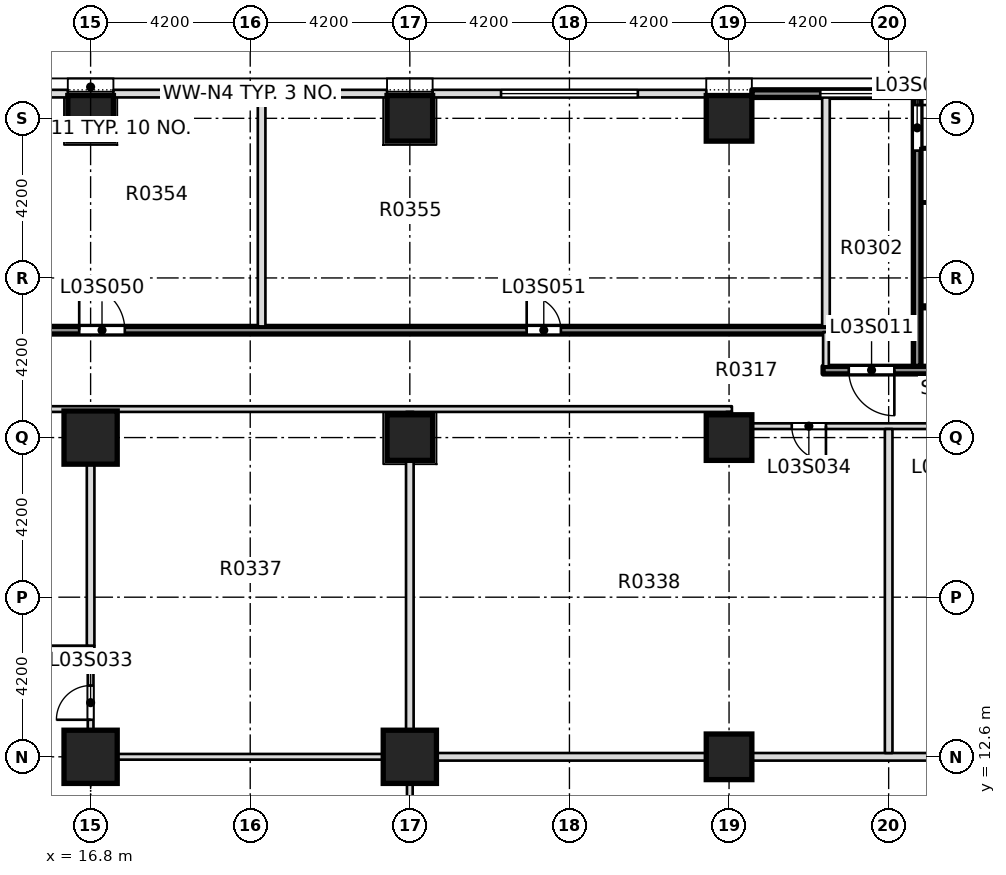
"""IFC4 building model, lengths in metres.
Left out: names, types, materials, properties, quantities, classifications, styles, units other than length and angle.
Written with IfcOpenShell. Run it as: python <this file> out.ifc"""

import sys

from ifc_helpers import new_model, si_unit, direction, frame, frame_2d, origin, origin_2d, place, context, subcontext, project, spatial, rectangle, extrude, element, fill, save


model = new_model("IFC4")
c1 = context("Model", 3, precision=1e-05, world=origin(), true_north=direction((0.0, 1.0)))
c2 = subcontext(c1, "Body", "Model", "MODEL_VIEW")
j1 = project(units=[si_unit("LENGTHUNIT", "METRE"), si_unit("PLANEANGLEUNIT", "RADIAN")], contexts=[c1])
p1 = place(None, origin())
s1 = spatial("IfcSite", under=j1, at=p1, CompositionType="ELEMENT")
p2 = place(p1, origin())
s2 = spatial("IfcBuilding", under=s1, at=p2, CompositionType="ELEMENT")
p3 = place(p2, frame((0.0, 0.0, 20.0)))
s3 = spatial("IfcBuildingStorey", under=s2, at=p3, CompositionType="ELEMENT", Elevation=20.0)
for number, where, z_axis, x_axis in (
    (1, (16.8, 12.6, -0.4), (0.0, 0.0, 1.0), (1.0, 0.0, 0.0)),
    (2, (25.2, 12.6, -0.4), (0.0, 0.0, 1.0), (1.0, 0.0, 0.0)),
    (3, (16.8, 21.0, -0.4), (0.0, 0.0, 1.0), (1.0, 0.0, 0.0)),
):
    element("IfcColumn", number, at=place(p3, frame(where, z_axis=z_axis, x_axis=x_axis)), inside=s3, PredefinedType="COLUMN", context=c2, shape_type="SweptSolid", body=[
        extrude(rectangle(XDim=1.4, YDim=1.4, at=origin_2d()), origin(), (0.0, 0.0, 1.0), 5.0),
    ])
p4 = place(p3, frame((33.6, 12.6, -0.4), z_axis=(0.0, 0.0, 1.0), x_axis=(1.0, 0.0, 0.0)))
e4 = element("IfcColumn", 4, at=p4, inside=s3, PredefinedType="COLUMN", context=c2, shape_type="SweptSolid", body=[
    extrude(rectangle(XDim=1.2, YDim=1.2, at=origin_2d()), origin(), (0.0, 0.0, 1.0), 5.4),
])
p5 = place(p3, frame((25.2, 21.0, 0.0), z_axis=(0.0, 0.0, 1.0), x_axis=(1.0, 0.0, 0.0)))
e5 = element("IfcColumn", 5, at=p5, inside=s3, PredefinedType="COLUMN", context=c2, shape_type="SweptSolid", body=[
    extrude(rectangle(XDim=1.2, YDim=1.2, at=origin_2d()), origin(), (0.0, 0.0, 1.0), 5.0),
])
p6 = place(p3, frame((33.6, 21.0, -0.4), z_axis=(0.0, 0.0, 1.0), x_axis=(1.0, 0.0, 0.0)))
e6 = element("IfcColumn", 6, at=p6, inside=s3, PredefinedType="COLUMN", context=c2, shape_type="SweptSolid", body=[
    extrude(rectangle(XDim=1.2, YDim=1.2, at=origin_2d()), origin(), (0.0, 0.0, 1.0), 5.4),
])
for number, where, z_axis, x_axis in (
    (7, (16.8, 29.4, 0.0), (0.0, 0.0, 1.0), (1.0, 0.0, 0.0)),
    (8, (25.2, 29.4, 0.0), (0.0, 0.0, 1.0), (1.0, 0.0, 0.0)),
):
    element("IfcColumn", number, at=place(p3, frame(where, z_axis=z_axis, x_axis=x_axis)), inside=s3, PredefinedType="COLUMN", context=c2, shape_type="SweptSolid", body=[
        extrude(rectangle(XDim=1.2, YDim=1.2, at=origin_2d()), origin(), (0.0, 0.0, 1.0), 5.0),
    ])
p7 = place(p3, frame((33.6, 29.4, -0.4), z_axis=(0.0, 0.0, 1.0), x_axis=(1.0, 0.0, 0.0)))
e9 = element("IfcColumn", 9, at=p7, inside=s3, PredefinedType="COLUMN", context=c2, shape_type="SweptSolid", body=[
    extrude(rectangle(XDim=1.2, YDim=1.2, at=origin_2d()), origin(), (0.0, 0.0, 1.0), 5.4),
])
p8 = place(p3, frame((16.725, 12.6, 0.0), z_axis=(0.0, 0.0, 1.0), x_axis=(1.0, 0.0, 0.0)))
e10 = element("IfcWall", 10, at=p8, inside=s3, PredefinedType="PARTITIONING", context=c2, shape_type="SweptSolid", body=[
    extrude(rectangle(XDim=8.575, YDim=0.15, at=frame_2d((4.288, 0.0))), origin(), (0.0, 0.0, 1.0), 4.6),
])
p9 = place(p3, frame((25.1, 12.6, 0.0), z_axis=(0.0, 0.0, 1.0), x_axis=(1.0, 0.0, 0.0)))
e11 = element("IfcWall", 11, at=p9, inside=s3, PredefinedType="PARTITIONING", context=c2, shape_type="SweptSolid", body=[
    extrude(rectangle(XDim=25.85, YDim=0.2, at=frame_2d((12.925, 0.0))), origin(), (0.0, 0.0, 1.0), 4.6),
])
p10 = place(p3, frame((12.601, 15.45, 0.0), z_axis=(0.0, 0.0, 1.0), x_axis=(1.0, 0.0, 0.0)))
e12 = element("IfcWall", 12, at=p10, inside=s3, PredefinedType="PARTITIONING", context=c2, shape_type="SweptSolid", body=[
    extrude(rectangle(XDim=4.299, YDim=0.15, at=frame_2d((2.149, 0.0))), origin(), (0.0, 0.0, 1.0), 4.6),
])
p11 = place(p10, frame((1.549, 0.0, 0.0)))
e13 = element("IfcOpeningElement", 13, at=p11, cuts=e12, PredefinedType="OPENING", context=c2, shape_type="SweptSolid", body=[
    extrude(rectangle(XDim=1.1, YDim=2.1, at=frame_2d((0.55, 1.05))), frame((0.0, 0.085, 0.0), z_axis=(0.0, -1.0, 0.0), x_axis=(1.0, 0.0, 0.0)), (0.0, 0.0, 1.0), 0.17),
])
p12 = place(p3, frame((33.525, 21.3, 0.0), z_axis=(0.0, 0.0, 1.0), x_axis=(1.0, 0.0, 0.0)))
e14 = element("IfcWall", 14, at=p12, inside=s3, PredefinedType="PARTITIONING", context=c2, shape_type="SweptSolid", body=[
    extrude(rectangle(XDim=8.85, YDim=0.15, at=frame_2d((4.425, 0.0))), origin(), (0.0, 0.0, 1.0), 4.6),
])
p13 = place(p12, frame((1.725, 0.0, 0.0)))
e15 = element("IfcOpeningElement", 15, at=p13, cuts=e14, PredefinedType="OPENING", context=c2, shape_type="SweptSolid", body=[
    extrude(rectangle(XDim=0.9, YDim=2.1, at=frame_2d((0.45, 1.05))), frame((0.0, 0.085, 0.0), z_axis=(0.0, -1.0, 0.0), x_axis=(1.0, 0.0, 0.0)), (0.0, 0.0, 1.0), 0.17),
])
p14 = place(p12, frame((5.525, 0.0, 0.0)))
e16 = element("IfcOpeningElement", 16, at=p14, cuts=e14, PredefinedType="OPENING", context=c2, shape_type="SweptSolid", body=[
    extrude(rectangle(XDim=0.9, YDim=2.1, at=frame_2d((0.45, 1.05))), frame((0.0, 0.085, 0.0), z_axis=(0.0, -1.0, 0.0), x_axis=(1.0, 0.0, 0.0)), (0.0, 0.0, 1.0), 0.17),
])
p15 = place(p3, frame((12.601, 21.75, 0.0), z_axis=(0.0, 0.0, 1.0), x_axis=(1.0, 0.0, 0.0)))
e17 = element("IfcWall", 17, at=p15, inside=s3, PredefinedType="PARTITIONING", context=c2, shape_type="SweptSolid", body=[
    extrude(rectangle(XDim=21.074, YDim=0.15, at=frame_2d((10.537, 0.0))), origin(), (0.0, 0.0, 1.0), 4.6),
])
p16 = place(p3, frame((36.075, 22.775, 0.0), z_axis=(0.0, 0.0, 1.0), x_axis=(1.0, 0.0, 0.0)))
e18 = element("IfcWall", 18, at=p16, inside=s3, PredefinedType="SOLIDWALL", context=c2, shape_type="SweptSolid", body=[
    extrude(rectangle(XDim=6.3, YDim=0.2, at=frame_2d((3.15, 0.0))), origin(), (0.0, 0.0, 1.0), 4.6),
])
p17 = place(p16, frame((0.675, 0.0, 0.0)))
e19 = element("IfcOpeningElement", 19, at=p17, cuts=e18, PredefinedType="OPENING", context=c2, shape_type="SweptSolid", body=[
    extrude(rectangle(XDim=1.2, YDim=2.1, at=frame_2d((0.6, 1.05))), frame((0.0, 0.11, 0.0), z_axis=(0.0, -1.0, 0.0), x_axis=(1.0, 0.0, 0.0)), (0.0, 0.0, 1.0), 0.22),
])
p18 = place(p3, frame((16.8, 12.675, 0.0), z_axis=(0.0, 0.0, 1.0), x_axis=(0.0, 1.0, 0.0)))
e20 = element("IfcWall", 20, at=p18, inside=s3, PredefinedType="PARTITIONING", context=c2, shape_type="SweptSolid", body=[
    extrude(rectangle(XDim=2.7, YDim=0.15, at=frame_2d((1.35, 0.0))), origin(), (0.0, 0.0, 1.0), 4.6),
])
p19 = place(p18, frame((0.9, 0.0, 0.0)))
e21 = element("IfcOpeningElement", 21, at=p19, cuts=e20, PredefinedType="OPENING", context=c2, shape_type="SweptSolid", body=[
    extrude(rectangle(XDim=0.9, YDim=2.1, at=frame_2d((0.45, 1.05))), frame((0.0, 0.085, 0.0), z_axis=(0.0, -1.0, 0.0), x_axis=(1.0, 0.0, 0.0)), (0.0, 0.0, 1.0), 0.17),
])
p20 = place(p3, frame((16.8, 15.525, 0.0), z_axis=(0.0, 0.0, 1.0), x_axis=(0.0, 1.0, 0.0)))
e22 = element("IfcWall", 22, at=p20, inside=s3, PredefinedType="PARTITIONING", context=c2, shape_type="SweptSolid", body=[
    extrude(rectangle(XDim=6.15, YDim=0.2, at=frame_2d((3.075, 0.0))), origin(), (0.0, 0.0, 1.0), 4.6),
])
p21 = place(p3, frame((21.3, 23.925, 0.0), z_axis=(0.0, 0.0, 1.0), x_axis=(0.0, 1.0, 0.0)))
e23 = element("IfcWall", 23, at=p21, inside=s3, PredefinedType="PARTITIONING", context=c2, shape_type="SweptSolid", body=[
    extrude(rectangle(XDim=6.025, YDim=0.2, at=frame_2d((3.012, 0.0))), origin(), (0.0, 0.0, 1.0), 4.6),
])
p22 = place(p3, frame((25.2, -11.8, 0.0), z_axis=(0.0, 0.0, 1.0), x_axis=(0.0, 1.0, 0.0)))
e24 = element("IfcWall", 24, at=p22, inside=s3, PredefinedType="PARTITIONING", context=c2, shape_type="SweptSolid", body=[
    extrude(rectangle(XDim=24.3, YDim=0.15, at=frame_2d((12.15, 0.0))), origin(), (0.0, 0.0, 1.0), 4.6),
])
p23 = place(p22, frame((2.184, 0.0, 0.0)))
e25 = element("IfcOpeningElement", 25, at=p23, cuts=e24, PredefinedType="OPENING", context=c2, shape_type="SweptSolid", body=[
    extrude(rectangle(XDim=0.9, YDim=2.1, at=frame_2d((0.45, 1.05))), frame((0.0, 0.085, 0.0), z_axis=(0.0, -1.0, 0.0), x_axis=(1.0, 0.0, 0.0)), (0.0, 0.0, 1.0), 0.17),
])
p24 = place(p22, frame((8.4, 0.0, 0.0)))
e26 = element("IfcOpeningElement", 26, at=p24, cuts=e24, PredefinedType="OPENING", context=c2, shape_type="SweptSolid", body=[
    extrude(rectangle(XDim=0.9, YDim=2.1, at=frame_2d((0.45, 1.05))), frame((0.0, 0.085, 0.0), z_axis=(0.0, -1.0, 0.0), x_axis=(1.0, 0.0, 0.0)), (0.0, 0.0, 1.0), 0.17),
])
p25 = place(p22, frame((12.866, 0.0, 0.0)))
e27 = element("IfcOpeningElement", 27, at=p25, cuts=e24, PredefinedType="OPENING", context=c2, shape_type="SweptSolid", body=[
    extrude(rectangle(XDim=0.9, YDim=2.1, at=frame_2d((0.45, 1.05))), frame((0.0, 0.085, 0.0), z_axis=(0.0, -1.0, 0.0), x_axis=(1.0, 0.0, 0.0)), (0.0, 0.0, 1.0), 0.17),
])
p26 = place(p22, frame((16.8, 0.0, 0.0)))
e28 = element("IfcOpeningElement", 28, at=p26, cuts=e24, PredefinedType="OPENING", context=c2, shape_type="SweptSolid", body=[
    extrude(rectangle(XDim=0.9, YDim=2.1, at=frame_2d((0.45, 1.05))), frame((0.0, 0.085, 0.0), z_axis=(0.0, -1.0, 0.0), x_axis=(1.0, 0.0, 0.0)), (0.0, 0.0, 1.0), 0.17),
])
p27 = place(p3, frame((25.2, 12.7, 0.0), z_axis=(0.0, 0.0, 1.0), x_axis=(0.0, 1.0, 0.0)))
e29 = element("IfcWall", 29, at=p27, inside=s3, PredefinedType="PARTITIONING", context=c2, shape_type="SweptSolid", body=[
    extrude(rectangle(XDim=8.975, YDim=0.2, at=frame_2d((4.488, 0.0))), origin(), (0.0, 0.0, 1.0), 4.6),
])
p28 = place(p3, frame((33.6, 21.375, 0.0), z_axis=(0.0, 0.0, 1.0), x_axis=(0.0, 1.0, 0.0)))
e30 = element("IfcWall", 30, at=p28, inside=s3, PredefinedType="PARTITIONING", context=c2, shape_type="SweptSolid", body=[
    extrude(rectangle(XDim=0.3, YDim=0.15, at=frame_2d((0.15, 0.0))), origin(), (0.0, 0.0, 1.0), 4.6),
])
p29 = place(p3, frame((36.15, 22.875, 0.0), z_axis=(0.0, 0.0, 1.0), x_axis=(0.0, 1.0, 0.0)))
e31 = element("IfcWall", 31, at=p29, inside=s3, PredefinedType="PARTITIONING", context=c2, shape_type="SweptSolid", body=[
    extrude(rectangle(XDim=0.9, YDim=0.15, at=frame_2d((0.45, 0.0))), origin(), (0.0, 0.0, 1.0), 4.6),
])
p30 = place(p3, frame((36.15, 23.925, 0.0), z_axis=(0.0, 0.0, 1.0), x_axis=(0.0, 1.0, 0.0)))
e32 = element("IfcWall", 32, at=p30, inside=s3, PredefinedType="PARTITIONING", context=c2, shape_type="SweptSolid", body=[
    extrude(rectangle(XDim=6.025, YDim=0.2, at=frame_2d((3.012, 0.0))), origin(), (0.0, 0.0, 1.0), 4.6),
])
p31 = place(p3, frame((37.8, 12.7, 0.0), z_axis=(0.0, 0.0, 1.0), x_axis=(0.0, 1.0, 0.0)))
e33 = element("IfcWall", 33, at=p31, inside=s3, PredefinedType="PARTITIONING", context=c2, shape_type="SweptSolid", body=[
    extrude(rectangle(XDim=8.525, YDim=0.2, at=frame_2d((4.263, 0.0))), origin(), (0.0, 0.0, 1.0), 4.6),
])
p32 = place(p3, frame((38.55, 22.875, 0.0), z_axis=(0.0, 0.0, 1.0), x_axis=(0.0, 1.0, 0.0)))
e34 = element("IfcWall", 34, at=p32, inside=s3, PredefinedType="SOLIDWALL", context=c2, shape_type="SweptSolid", body=[
    extrude(rectangle(XDim=7.075, YDim=0.2, at=frame_2d((3.538, 0.0))), origin(), (0.0, 0.0, 1.0), 4.6),
])
p33 = place(p32, frame((5.675, 0.0, 0.0)))
e35 = element("IfcOpeningElement", 35, at=p33, cuts=e34, PredefinedType="OPENING", context=c2, shape_type="SweptSolid", body=[
    extrude(rectangle(XDim=1.2, YDim=2.1, at=frame_2d((0.6, 1.05))), frame((0.0, 0.11, 0.0), z_axis=(0.0, -1.0, 0.0), x_axis=(1.0, 0.0, 0.0)), (0.0, 0.0, 1.0), 0.22),
])
p34 = place(p3, frame((34.2, 30.05, 0.0), z_axis=(0.0, 0.0, 1.0), x_axis=(1.0, 0.0, 0.0)))
e36 = element("IfcWall", 36, at=p34, inside=s3, PredefinedType="SOLIDWALL", context=c2, shape_type="SweptSolid", body=[
    extrude(rectangle(XDim=7.2, YDim=0.2, at=frame_2d((3.6, 0.0))), origin(), (0.0, 0.0, 1.0), 4.6),
])
p35 = place(p34, frame((1.8, 0.0, 0.9)))
e37 = element("IfcOpeningElement", 37, at=p35, cuts=e36, PredefinedType="OPENING", context=c2, shape_type="SweptSolid", body=[
    extrude(rectangle(XDim=3.6, YDim=2.8, at=frame_2d((1.8, 1.4))), frame((0.0, 0.11, 0.0), z_axis=(0.0, -1.0, 0.0), x_axis=(1.0, 0.0, 0.0)), (0.0, 0.0, 1.0), 0.22),
])
p36 = place(p3, frame((33.0, 30.05, 0.0), z_axis=(0.0, 0.0, 1.0), x_axis=(-1.0, 0.0, 0.0)))
e38 = element("IfcWall", 38, at=p36, inside=s3, PredefinedType="STANDARD", context=c2, shape_type="SweptSolid", body=[
    extrude(rectangle(XDim=7.2, YDim=0.2, at=frame_2d((3.6, 0.0))), origin(), (0.0, 0.0, 1.0), 4.6),
])
p37 = place(p36, frame((1.8, 0.0, 0.9)))
e39 = element("IfcOpeningElement", 39, at=p37, cuts=e38, PredefinedType="OPENING", context=c2, shape_type="SweptSolid", body=[
    extrude(rectangle(XDim=3.6, YDim=2.8, at=frame_2d((1.8, 1.4))), frame((0.0, 0.11, 0.0), z_axis=(0.0, -1.0, 0.0), x_axis=(1.0, 0.0, 0.0)), (0.0, 0.0, 1.0), 0.22),
])
p38 = place(p3, frame((24.6, 30.05, 0.0), z_axis=(0.0, 0.0, 1.0), x_axis=(-1.0, 0.0, 0.0)))
e40 = element("IfcWall", 40, at=p38, inside=s3, PredefinedType="STANDARD", context=c2, shape_type="SweptSolid", body=[
    extrude(rectangle(XDim=7.2, YDim=0.2, at=frame_2d((3.6, 0.0))), origin(), (0.0, 0.0, 1.0), 4.6),
])
p39 = place(p38, frame((1.8, 0.0, 0.9)))
e41 = element("IfcOpeningElement", 41, at=p39, cuts=e40, PredefinedType="OPENING", context=c2, shape_type="SweptSolid", body=[
    extrude(rectangle(XDim=3.6, YDim=2.8, at=frame_2d((1.8, 1.4))), frame((0.0, 0.11, 0.0), z_axis=(0.0, -1.0, 0.0), x_axis=(1.0, 0.0, 0.0)), (0.0, 0.0, 1.0), 0.22),
])
p40 = place(p3, frame((16.2, 30.05, 0.0), z_axis=(0.0, 0.0, 1.0), x_axis=(-1.0, 0.0, 0.0)))
e42 = element("IfcWall", 42, at=p40, inside=s3, PredefinedType="STANDARD", context=c2, shape_type="SweptSolid", body=[
    extrude(rectangle(XDim=7.2, YDim=0.2, at=frame_2d((3.6, 0.0))), origin(), (0.0, 0.0, 1.0), 4.6),
])
p41 = place(p40, frame((1.8, 0.0, 0.9)))
e43 = element("IfcOpeningElement", 43, at=p41, cuts=e42, PredefinedType="OPENING", context=c2, shape_type="SweptSolid", body=[
    extrude(rectangle(XDim=3.6, YDim=2.8, at=frame_2d((1.8, 1.4))), frame((0.0, 0.11, 0.0), z_axis=(0.0, -1.0, 0.0), x_axis=(1.0, 0.0, 0.0)), (0.0, 0.0, 1.0), 0.22),
])
p42 = place(p3, frame((4.55, 23.825, 0.0), z_axis=(0.0, 0.0, 1.0), x_axis=(1.0, 0.0, 0.0)))
e44 = element("IfcWall", 44, at=p42, inside=s3, PredefinedType="SOLIDWALL", context=c2, shape_type="SweptSolid", body=[
    extrude(rectangle(XDim=31.7, YDim=0.2, at=frame_2d((15.85, 0.0))), origin(), (0.0, 0.0, 1.0), 4.6),
])
p43 = place(p42, frame((3.7, 0.0, 0.0)))
e45 = element("IfcOpeningElement", 45, at=p43, cuts=e44, PredefinedType="OPENING", context=c2, shape_type="SweptSolid", body=[
    extrude(rectangle(XDim=0.9, YDim=2.1, at=frame_2d((0.45, 1.05))), frame((0.0, 0.11, 0.0), z_axis=(0.0, -1.0, 0.0), x_axis=(1.0, 0.0, 0.0)), (0.0, 0.0, 1.0), 0.22),
])
p44 = place(p42, frame((11.95, 0.0, 0.0)))
e46 = element("IfcOpeningElement", 46, at=p44, cuts=e44, PredefinedType="OPENING", context=c2, shape_type="SweptSolid", body=[
    extrude(rectangle(XDim=1.2, YDim=2.1, at=frame_2d((0.6, 1.05))), frame((0.0, 0.11, 0.0), z_axis=(0.0, -1.0, 0.0), x_axis=(1.0, 0.0, 0.0)), (0.0, 0.0, 1.0), 0.22),
])
p45 = place(p42, frame((23.725, 0.0, 0.0)))
e47 = element("IfcOpeningElement", 47, at=p45, cuts=e44, PredefinedType="OPENING", context=c2, shape_type="SweptSolid", body=[
    extrude(rectangle(XDim=0.9, YDim=2.1, at=frame_2d((0.45, 1.05))), frame((0.0, 0.11, 0.0), z_axis=(0.0, -1.0, 0.0), x_axis=(1.0, 0.0, 0.0)), (0.0, 0.0, 1.0), 0.22),
])
p46 = place(p33, origin())
e48 = element("IfcDoor", 48, at=p46, inside=s3, OperationType="DOUBLE_DOOR_SINGLE_SWING", PredefinedType="DOOR", context=c2, shape_type="SweptSolid", body=[
    extrude(rectangle(XDim=1.2, YDim=2.1, at=frame_2d((0.6, 1.05))), frame((0.0, 0.025, 0.0), z_axis=(0.0, -1.0, 0.0), x_axis=(1.0, 0.0, 0.0)), (0.0, 0.0, 1.0), 0.05),
])
fill(e35, e48)
p47 = place(p17, origin())
e49 = element("IfcDoor", 49, at=p47, inside=s3, OperationType="SINGLE_SWING_LEFT", PredefinedType="DOOR", context=c2, shape_type="SweptSolid", body=[
    extrude(rectangle(XDim=1.2, YDim=2.1, at=frame_2d((0.6, 1.05))), frame((0.0, 0.025, 0.0), z_axis=(0.0, -1.0, 0.0), x_axis=(1.0, 0.0, 0.0)), (0.0, 0.0, 1.0), 0.05),
])
fill(e19, e49)
p48 = place(p19, origin())
e50 = element("IfcDoor", 50, at=p48, inside=s3, OperationType="SINGLE_SWING_RIGHT", PredefinedType="DOOR", context=c2, shape_type="SweptSolid", body=[
    extrude(rectangle(XDim=0.9, YDim=2.1, at=frame_2d((0.45, 1.05))), frame((0.0, 0.025, 0.0), z_axis=(0.0, -1.0, 0.0), x_axis=(1.0, 0.0, 0.0)), (0.0, 0.0, 1.0), 0.05),
])
fill(e21, e50)
p49 = place(p13, origin())
e51 = element("IfcDoor", 51, at=p49, inside=s3, OperationType="SINGLE_SWING_LEFT", PredefinedType="DOOR", context=c2, shape_type="SweptSolid", body=[
    extrude(rectangle(XDim=0.9, YDim=2.1, at=frame_2d((0.45, 1.05))), frame((0.0, 0.025, 0.0), z_axis=(0.0, -1.0, 0.0), x_axis=(1.0, 0.0, 0.0)), (0.0, 0.0, 1.0), 0.05),
])
fill(e15, e51)
p50 = place(p44, origin())
e52 = element("IfcDoor", 52, at=p50, inside=s3, OperationType="SINGLE_SWING_RIGHT", PredefinedType="DOOR", context=c2, shape_type="SweptSolid", body=[
    extrude(rectangle(XDim=1.2, YDim=2.1, at=frame_2d((0.6, 1.05))), frame((0.0, 0.025, 0.0), z_axis=(0.0, -1.0, 0.0), x_axis=(1.0, 0.0, 0.0)), (0.0, 0.0, 1.0), 0.05),
])
fill(e46, e52)
p51 = place(p45, origin())
e53 = element("IfcDoor", 53, at=p51, inside=s3, OperationType="SINGLE_SWING_LEFT", PredefinedType="DOOR", context=c2, shape_type="SweptSolid", body=[
    extrude(rectangle(XDim=0.9, YDim=2.1, at=frame_2d((0.45, 1.05))), frame((0.0, 0.025, 0.0), z_axis=(0.0, -1.0, 0.0), x_axis=(1.0, 0.0, 0.0)), (0.0, 0.0, 1.0), 0.05),
])
fill(e47, e53)
p52 = place(p35, origin())
e54 = element("IfcWindow", 54, at=p52, inside=s3, PartitioningType="SINGLE_PANEL", PredefinedType="WINDOW", context=c2, shape_type="SweptSolid", body=[
    extrude(rectangle(XDim=3.6, YDim=2.8, at=frame_2d((1.8, 1.4))), frame((0.0, 0.03, 0.0), z_axis=(0.0, -1.0, 0.0), x_axis=(1.0, 0.0, 0.0)), (0.0, 0.0, 1.0), 0.06),
])
fill(e37, e54)
p53 = place(p37, origin())
e55 = element("IfcWindow", 55, at=p53, inside=s3, PartitioningType="SINGLE_PANEL", PredefinedType="WINDOW", context=c2, shape_type="SweptSolid", body=[
    extrude(rectangle(XDim=3.6, YDim=2.8, at=frame_2d((1.8, 1.4))), frame((0.0, 0.03, 0.0), z_axis=(0.0, -1.0, 0.0), x_axis=(1.0, 0.0, 0.0)), (0.0, 0.0, 1.0), 0.06),
])
fill(e39, e55)
p54 = place(p39, origin())
e56 = element("IfcWindow", 56, at=p54, inside=s3, PartitioningType="SINGLE_PANEL", PredefinedType="WINDOW", context=c2, shape_type="SweptSolid", body=[
    extrude(rectangle(XDim=3.6, YDim=2.8, at=frame_2d((1.8, 1.4))), frame((0.0, 0.03, 0.0), z_axis=(0.0, -1.0, 0.0), x_axis=(1.0, 0.0, 0.0)), (0.0, 0.0, 1.0), 0.06),
])
fill(e41, e56)
save(model, sys.argv[1])
